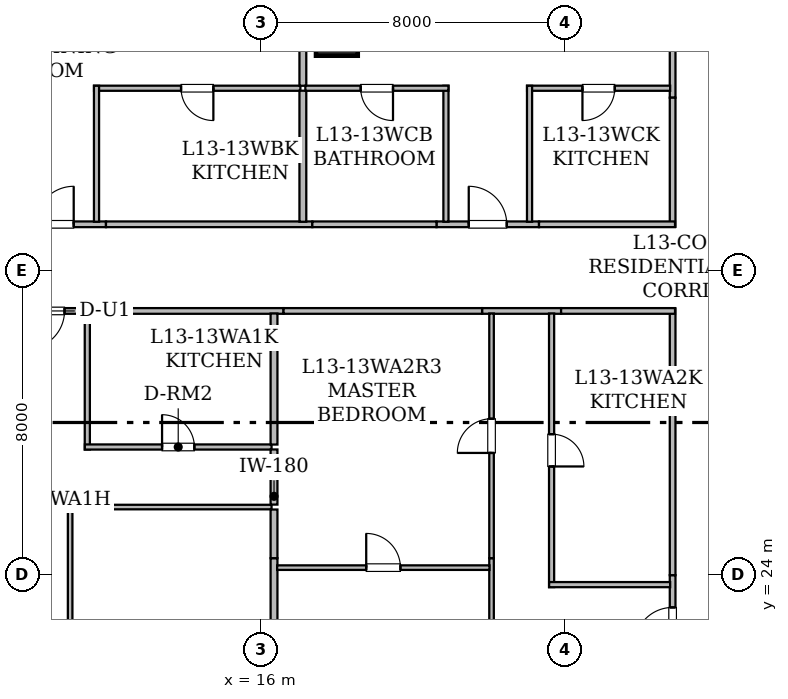
"""IFC4 building model, lengths in metres.
Left out: names, types, materials, properties, quantities, classifications, styles, units other than length and angle.
Written with IfcOpenShell. Run it as: python <this file> out.ifc"""

import sys

from ifc_helpers import new_model, si_unit, direction, frame, frame_2d, origin, origin_2d, place, context, subcontext, project, spatial, rectangle, hollow_rectangle, extrude, element, fill, save


model = new_model("IFC4")
c1 = context("Model", 3, precision=1e-05, world=origin(), true_north=direction((0.0, 1.0)))
c2 = subcontext(c1, "Body", "Model", "MODEL_VIEW")
j1 = project(units=[si_unit("LENGTHUNIT", "METRE"), si_unit("PLANEANGLEUNIT", "RADIAN")], contexts=[c1])
p1 = place(None, origin())
s1 = spatial("IfcSite", under=j1, at=p1, CompositionType="ELEMENT")
p2 = place(p1, origin())
s2 = spatial("IfcBuilding", under=s1, at=p2, CompositionType="ELEMENT")
p3 = place(p2, frame((0.0, 0.0, 55.2)))
s3 = spatial("IfcBuildingStorey", under=s2, at=p3, CompositionType="ELEMENT", Elevation=55.2)
p4 = place(p3, frame((18.0, 38.2, 0.0), z_axis=(0.0, 0.0, 1.0), x_axis=(1.0, 0.0, 0.0)))
e1 = element("IfcColumn", 1, at=p4, inside=s3, PredefinedType="COLUMN", context=c2, shape_type="SweptSolid", body=[
    extrude(hollow_rectangle(XDim=1.1, YDim=1.1, WallThickness=0.055, at=origin_2d()), origin(), (0.0, 0.0, 1.0), 3.65),
])
p5 = place(p3, frame((11.682, 30.935, 0.0), z_axis=(0.0, 0.0, 1.0), x_axis=(-1.0, 0.0, 0.0)))
e2 = element("IfcWall", 2, at=p5, inside=s3, PredefinedType="STANDARD", context=c2, shape_type="SweptSolid", body=[
    extrude(rectangle(XDim=2.698, YDim=0.15, at=frame_2d((1.349, 0.0))), origin(), (0.0, 0.0, 1.0), 3.43),
])
p6 = place(p5, frame((0.849, 0.0, 0.0)))
e3 = element("IfcOpeningElement", 3, at=p6, cuts=e2, PredefinedType="OPENING", context=c2, shape_type="SweptSolid", body=[
    extrude(rectangle(XDim=1.0, YDim=2.15, at=frame_2d((0.5, 1.075))), frame((0.0, 0.085, 0.0), z_axis=(0.0, -1.0, 0.0), x_axis=(1.0, 0.0, 0.0)), (0.0, 0.0, 1.0), 0.17),
])
p7 = place(p3, frame((16.596, 30.935, 0.0), z_axis=(0.0, 0.0, 1.0), x_axis=(-1.0, 0.0, 0.0)))
e4 = element("IfcWall", 4, at=p7, inside=s3, PredefinedType="STANDARD", context=c2, shape_type="SweptSolid", body=[
    extrude(rectangle(XDim=4.914, YDim=0.15, at=frame_2d((2.457, 0.0))), origin(), (0.0, 0.0, 1.0), 3.43),
])
p8 = place(p3, frame((26.835, 21.285, 0.0), z_axis=(0.0, 0.0, 1.0), x_axis=(0.0, 1.0, 0.0)))
e5 = element("IfcWall", 5, at=p8, inside=s3, PredefinedType="STANDARD", context=c2, shape_type="SweptSolid", body=[
    extrude(rectangle(XDim=2.698, YDim=0.15, at=frame_2d((1.349, 0.0))), origin(), (0.0, 0.0, 1.0), 3.43),
])
p9 = place(p8, frame((0.849, 0.0, 0.0)))
e6 = element("IfcOpeningElement", 6, at=p9, cuts=e5, PredefinedType="OPENING", context=c2, shape_type="SweptSolid", body=[
    extrude(rectangle(XDim=1.0, YDim=2.15, at=frame_2d((0.5, 1.075))), frame((0.0, 0.085, 0.0), z_axis=(0.0, -1.0, 0.0), x_axis=(1.0, 0.0, 0.0)), (0.0, 0.0, 1.0), 0.17),
])
p10 = place(p3, frame((23.9, 30.935, 0.0), z_axis=(0.0, 0.0, 1.0), x_axis=(-1.0, 0.0, 0.0)))
e7 = element("IfcWall", 7, at=p10, inside=s3, PredefinedType="STANDARD", context=c2, shape_type="SweptSolid", body=[
    extrude(rectangle(XDim=2.079, YDim=0.15, at=frame_2d((1.04, 0.0))), origin(), (0.0, 0.0, 1.0), 3.43),
])
p11 = place(p3, frame((26.835, 23.983, 0.0), z_axis=(0.0, 0.0, 1.0), x_axis=(0.0, 1.0, 0.0)))
e8 = element("IfcWall", 8, at=p11, inside=s3, PredefinedType="STANDARD", context=c2, shape_type="SweptSolid", body=[
    extrude(rectangle(XDim=7.017, YDim=0.15, at=frame_2d((3.509, 0.0))), origin(), (0.0, 0.0, 1.0), 2.957),
])
p12 = place(p3, frame((26.898, 30.935, 0.0), z_axis=(0.0, 0.0, 1.0), x_axis=(-1.0, 0.0, 0.0)))
e9 = element("IfcWall", 9, at=p12, inside=s3, PredefinedType="STANDARD", context=c2, shape_type="SweptSolid", body=[
    extrude(rectangle(XDim=2.998, YDim=0.15, at=frame_2d((1.499, 0.0))), origin(), (0.0, 0.0, 1.0), 3.43),
])
p13 = place(p3, frame((21.821, 30.935, 0.0), z_axis=(0.0, 0.0, 1.0), x_axis=(-1.0, 0.0, 0.0)))
e10 = element("IfcWall", 10, at=p13, inside=s3, PredefinedType="STANDARD", context=c2, shape_type="SweptSolid", body=[
    extrude(rectangle(XDim=5.225, YDim=0.15, at=frame_2d((2.613, 0.0))), origin(), (0.0, 0.0, 1.0), 2.647),
])
p14 = place(p3, frame((9.226, 33.215, 0.0), z_axis=(0.0, 0.0, 1.0), x_axis=(1.0, 0.0, 0.0)))
e11 = element("IfcWall", 11, at=p14, inside=s3, PredefinedType="STANDARD", context=c2, shape_type="SweptSolid", body=[
    extrude(rectangle(XDim=2.698, YDim=0.15, at=frame_2d((1.349, 0.0))), origin(), (0.0, 0.0, 1.0), 3.43),
])
p15 = place(p14, frame((0.849, 0.0, 0.0)))
e12 = element("IfcOpeningElement", 12, at=p15, cuts=e11, PredefinedType="OPENING", context=c2, shape_type="SweptSolid", body=[
    extrude(rectangle(XDim=1.0, YDim=2.15, at=frame_2d((0.5, 1.075))), frame((0.0, 0.085, 0.0), z_axis=(0.0, -1.0, 0.0), x_axis=(1.0, 0.0, 0.0)), (0.0, 0.0, 1.0), 0.17),
])
p16 = place(p3, frame((11.924, 33.215, 0.0), z_axis=(0.0, 0.0, 1.0), x_axis=(1.0, 0.0, 0.0)))
e13 = element("IfcWall", 13, at=p16, inside=s3, PredefinedType="STANDARD", context=c2, shape_type="SweptSolid", body=[
    extrude(rectangle(XDim=5.43, YDim=0.15, at=frame_2d((2.715, 0.0))), origin(), (0.0, 0.0, 1.0), 3.43),
])
p17 = place(p3, frame((26.835, 36.546, 0.0), z_axis=(0.0, 0.0, 1.0), x_axis=(0.0, 1.0, 0.0)))
e14 = element("IfcWall", 14, at=p17, inside=s3, PredefinedType="STANDARD", context=c2, shape_type="SweptSolid", body=[
    extrude(rectangle(XDim=2.554, YDim=0.15, at=frame_2d((1.277, 0.0))), origin(), (0.0, 0.0, 1.0), 2.647),
])
p18 = place(p3, frame((20.621, 33.215, 0.0), z_axis=(0.0, 0.0, 1.0), x_axis=(1.0, 0.0, 0.0)))
e15 = element("IfcWall", 15, at=p18, inside=s3, PredefinedType="STANDARD", context=c2, shape_type="SweptSolid", body=[
    extrude(rectangle(XDim=2.698, YDim=0.15, at=frame_2d((1.349, 0.0))), origin(), (0.0, 0.0, 1.0), 3.43),
])
p19 = place(p18, frame((0.849, 0.0, 0.0)))
e16 = element("IfcOpeningElement", 16, at=p19, cuts=e15, PredefinedType="OPENING", context=c2, shape_type="SweptSolid", body=[
    extrude(rectangle(XDim=1.0, YDim=2.15, at=frame_2d((0.5, 1.075))), frame((0.0, 0.085, 0.0), z_axis=(0.0, -1.0, 0.0), x_axis=(1.0, 0.0, 0.0)), (0.0, 0.0, 1.0), 0.17),
])
p20 = place(p3, frame((17.354, 33.215, 0.0), z_axis=(0.0, 0.0, 1.0), x_axis=(1.0, 0.0, 0.0)))
e17 = element("IfcWall", 17, at=p20, inside=s3, PredefinedType="STANDARD", context=c2, shape_type="SweptSolid", body=[
    extrude(rectangle(XDim=3.267, YDim=0.15, at=frame_2d((1.634, 0.0))), origin(), (0.0, 0.0, 1.0), 2.647),
])
p21 = place(p3, frame((26.835, 33.15, 0.0), z_axis=(0.0, 0.0, 1.0), x_axis=(0.0, 1.0, 0.0)))
e18 = element("IfcWall", 18, at=p21, inside=s3, PredefinedType="STANDARD", context=c2, shape_type="SweptSolid", body=[
    extrude(rectangle(XDim=3.396, YDim=0.15, at=frame_2d((1.698, 0.0))), origin(), (0.0, 0.0, 1.0), 3.43),
])
p22 = place(p3, frame((23.319, 33.215, 0.0), z_axis=(0.0, 0.0, 1.0), x_axis=(1.0, 0.0, 0.0)))
e19 = element("IfcWall", 19, at=p22, inside=s3, PredefinedType="STANDARD", context=c2, shape_type="SweptSolid", body=[
    extrude(rectangle(XDim=3.579, YDim=0.15, at=frame_2d((1.79, 0.0))), origin(), (0.0, 0.0, 1.0), 3.43),
])
p23 = place(p3, frame((11.433, 30.868, 0.0), z_axis=(0.0, 0.0, 1.0), x_axis=(0.0, -1.0, 0.0)))
e20 = element("IfcWall", 20, at=p23, inside=s3, PredefinedType="PARTITIONING", context=c2, shape_type="SweptSolid", body=[
    extrude(rectangle(XDim=3.578, YDim=0.135, at=frame_2d((1.789, 0.0))), origin(), (0.0, 0.0, 1.0), 3.43),
])
p24 = place(p3, frame((11.368, 27.355, 0.0), z_axis=(0.0, 0.0, 1.0), x_axis=(1.0, 0.0, 0.0)))
e21 = element("IfcWall", 21, at=p24, inside=s3, PredefinedType="PARTITIONING", context=c2, shape_type="SweptSolid", body=[
    extrude(rectangle(XDim=4.913, YDim=0.135, at=frame_2d((2.457, 0.0))), origin(), (0.0, 0.0, 1.0), 3.43),
])
p25 = place(p24, frame((2.032, 0.0, 0.0)))
e22 = element("IfcOpeningElement", 22, at=p25, cuts=e21, PredefinedType="OPENING", context=c2, shape_type="SweptSolid", body=[
    extrude(rectangle(XDim=0.85, YDim=2.1, at=frame_2d((0.425, 1.05))), frame((0.0, 0.077, 0.0), z_axis=(0.0, -1.0, 0.0), x_axis=(1.0, 0.0, 0.0)), (0.0, 0.0, 1.0), 0.155),
])
p26 = place(p3, frame((16.281, 25.775, 0.0), z_axis=(0.0, 0.0, 1.0), x_axis=(-1.0, 0.0, 0.0)))
e23 = element("IfcWall", 23, at=p26, inside=s3, PredefinedType="PARTITIONING", context=c2, shape_type="SweptSolid", body=[
    extrude(rectangle(XDim=5.365, YDim=0.12, at=frame_2d((2.683, 0.0))), origin(), (0.0, 0.0, 1.0), 3.43),
])
p27 = place(p3, frame((10.981, 25.84, 0.0), z_axis=(0.0, 0.0, 1.0), x_axis=(0.0, -1.0, 0.0)))
e24 = element("IfcWall", 24, at=p27, inside=s3, PredefinedType="PARTITIONING", context=c2, shape_type="SweptSolid", body=[
    extrude(rectangle(XDim=8.565, YDim=0.12, at=frame_2d((4.283, 0.0))), origin(), (0.0, 0.0, 1.0), 2.647),
])
p28 = place(p27, frame((3.832, 0.0, 0.0)))
e25 = element("IfcOpeningElement", 25, at=p28, cuts=e24, PredefinedType="OPENING", context=c2, shape_type="SweptSolid", body=[
    extrude(rectangle(XDim=0.9, YDim=2.1, at=frame_2d((0.45, 1.05))), frame((0.0, 0.07, 0.0), z_axis=(0.0, -1.0, 0.0), x_axis=(1.0, 0.0, 0.0)), (0.0, 0.0, 1.0), 0.14),
])
p29 = place(p3, frame((16.346, 27.29, 0.0), z_axis=(0.0, 0.0, 1.0), x_axis=(0.0, -1.0, 0.0)))
e26 = element("IfcWall", 26, at=p29, inside=s3, PredefinedType="STANDARD", context=c2, shape_type="SweptSolid", body=[
    extrude(rectangle(XDim=1.45, YDim=0.18, at=frame_2d((0.725, 0.0))), origin(), (0.0, 0.0, 1.0), 3.43),
])
p30 = place(p3, frame((16.346, 30.868, 0.0), z_axis=(0.0, 0.0, 1.0), x_axis=(0.0, -1.0, 0.0)))
e27 = element("IfcWall", 27, at=p30, inside=s3, PredefinedType="STANDARD", context=c2, shape_type="SweptSolid", body=[
    extrude(rectangle(XDim=3.448, YDim=0.18, at=frame_2d((1.724, 0.0))), origin(), (0.0, 0.0, 1.0), 3.43),
])
p31 = place(p3, frame((16.346, 24.43, 0.0), z_axis=(0.0, 0.0, 1.0), x_axis=(0.0, -1.0, 0.0)))
e28 = element("IfcWall", 28, at=p31, inside=s3, PredefinedType="STANDARD", context=c2, shape_type="SweptSolid", body=[
    extrude(rectangle(XDim=7.339, YDim=0.18, at=frame_2d((3.669, 0.0))), origin(), (0.0, 0.0, 1.0), 2.647),
])
p32 = place(p3, frame((16.346, 25.71, 0.0), z_axis=(0.0, 0.0, 1.0), x_axis=(0.0, -1.0, 0.0)))
e29 = element("IfcWall", 29, at=p32, inside=s3, PredefinedType="STANDARD", context=c2, shape_type="SweptSolid", body=[
    extrude(rectangle(XDim=1.28, YDim=0.18, at=frame_2d((0.64, 0.0))), origin(), (0.0, 0.0, 1.0), 2.957),
])
p33 = place(p3, frame((23.65, 30.868, 0.0), z_axis=(0.0, 0.0, 1.0), x_axis=(0.0, -1.0, 0.0)))
e30 = element("IfcWall", 30, at=p33, inside=s3, PredefinedType="PARTITIONING", context=c2, shape_type="SweptSolid", body=[
    extrude(rectangle(XDim=7.199, YDim=0.135, at=frame_2d((3.6, 0.0))), origin(), (0.0, 0.0, 1.0), 2.957),
])
p34 = place(p33, frame((3.175, 0.0, 0.0)))
e31 = element("IfcOpeningElement", 31, at=p34, cuts=e30, PredefinedType="OPENING", context=c2, shape_type="SweptSolid", body=[
    extrude(rectangle(XDim=0.85, YDim=2.1, at=frame_2d((0.425, 1.05))), frame((0.0, 0.077, 0.0), z_axis=(0.0, -1.0, 0.0), x_axis=(1.0, 0.0, 0.0)), (0.0, 0.0, 1.0), 0.155),
])
p35 = place(p3, frame((23.585, 23.734, 0.0), z_axis=(0.0, 0.0, 1.0), x_axis=(1.0, 0.0, 0.0)))
e32 = element("IfcWall", 32, at=p35, inside=s3, PredefinedType="PARTITIONING", context=c2, shape_type="SweptSolid", body=[
    extrude(rectangle(XDim=3.185, YDim=0.135, at=frame_2d((1.593, 0.0))), origin(), (0.0, 0.0, 1.0), 3.43),
])
p36 = place(p3, frame((22.07, 13.125, 0.0), z_axis=(0.0, 0.0, 1.0), x_axis=(0.0, 1.0, 0.0)))
e33 = element("IfcWall", 33, at=p36, inside=s3, PredefinedType="PARTITIONING", context=c2, shape_type="SweptSolid", body=[
    extrude(rectangle(XDim=11.305, YDim=0.12, at=frame_2d((5.652, 0.0))), origin(), (0.0, 0.0, 1.0), 2.647),
])
p37 = place(p36, frame((5.181, 0.0, 0.0)))
e34 = element("IfcOpeningElement", 34, at=p37, cuts=e33, PredefinedType="OPENING", context=c2, shape_type="SweptSolid", body=[
    extrude(rectangle(XDim=0.9, YDim=2.1, at=frame_2d((0.45, 1.05))), frame((0.0, 0.07, 0.0), z_axis=(0.0, -1.0, 0.0), x_axis=(1.0, 0.0, 0.0)), (0.0, 0.0, 1.0), 0.14),
])
p38 = place(p3, frame((22.07, 24.43, 0.0), z_axis=(0.0, 0.0, 1.0), x_axis=(0.0, 1.0, 0.0)))
e35 = element("IfcWall", 35, at=p38, inside=s3, PredefinedType="PARTITIONING", context=c2, shape_type="SweptSolid", body=[
    extrude(rectangle(XDim=6.438, YDim=0.12, at=frame_2d((3.219, 0.0))), origin(), (0.0, 0.0, 1.0), 2.957),
])
p39 = place(p38, frame((2.769, 0.0, 0.0)))
e36 = element("IfcOpeningElement", 36, at=p39, cuts=e35, PredefinedType="OPENING", context=c2, shape_type="SweptSolid", body=[
    extrude(rectangle(XDim=0.9, YDim=2.1, at=frame_2d((0.45, 1.05))), frame((0.0, 0.07, 0.0), z_axis=(0.0, -1.0, 0.0), x_axis=(1.0, 0.0, 0.0)), (0.0, 0.0, 1.0), 0.14),
])
p40 = place(p3, frame((16.428, 24.181, 0.0), z_axis=(0.0, 0.0, 1.0), x_axis=(1.0, 0.0, 0.0)))
e37 = element("IfcWall", 37, at=p40, inside=s3, PredefinedType="PARTITIONING", context=c2, shape_type="SweptSolid", body=[
    extrude(rectangle(XDim=5.588, YDim=0.12, at=frame_2d((2.794, 0.0))), origin(), (0.0, 0.0, 1.0), 2.647),
])
p41 = place(p40, frame((2.344, 0.0, 0.0)))
e38 = element("IfcOpeningElement", 38, at=p41, cuts=e37, PredefinedType="OPENING", context=c2, shape_type="SweptSolid", body=[
    extrude(rectangle(XDim=0.9, YDim=2.1, at=frame_2d((0.45, 1.05))), frame((0.0, 0.07, 0.0), z_axis=(0.0, -1.0, 0.0), x_axis=(1.0, 0.0, 0.0)), (0.0, 0.0, 1.0), 0.14),
])
p42 = place(p3, frame((17.04, 36.795, 0.0), z_axis=(0.0, 0.0, 1.0), x_axis=(-1.0, 0.0, 0.0)))
e39 = element("IfcWall", 39, at=p42, inside=s3, PredefinedType="PARTITIONING", context=c2, shape_type="SweptSolid", body=[
    extrude(rectangle(XDim=5.43, YDim=0.135, at=frame_2d((2.715, 0.0))), origin(), (0.0, 0.0, 1.0), 3.43),
])
p43 = place(p42, frame((2.29, 0.0, 0.0)))
e40 = element("IfcOpeningElement", 40, at=p43, cuts=e39, PredefinedType="OPENING", context=c2, shape_type="SweptSolid", body=[
    extrude(rectangle(XDim=0.85, YDim=2.1, at=frame_2d((0.425, 1.05))), frame((0.0, 0.077, 0.0), z_axis=(0.0, -1.0, 0.0), x_axis=(1.0, 0.0, 0.0)), (0.0, 0.0, 1.0), 0.155),
])
p44 = place(p3, frame((11.675, 36.86, 0.0), z_axis=(0.0, 0.0, 1.0), x_axis=(0.0, -1.0, 0.0)))
e41 = element("IfcWall", 41, at=p44, inside=s3, PredefinedType="PARTITIONING", context=c2, shape_type="SweptSolid", body=[
    extrude(rectangle(XDim=3.578, YDim=0.135, at=frame_2d((1.789, 0.0))), origin(), (0.0, 0.0, 1.0), 3.43),
])
p45 = place(p3, frame((17.105, 39.11, 0.0), z_axis=(0.0, 0.0, 1.0), x_axis=(0.0, -1.0, 0.0)))
e42 = element("IfcWall", 42, at=p45, inside=s3, PredefinedType="STANDARD", context=c2, shape_type="SweptSolid", body=[
    extrude(rectangle(XDim=2.25, YDim=0.18, at=frame_2d((1.125, 0.0))), origin(), (0.0, 0.0, 1.0), 2.647),
])
p46 = place(p3, frame((17.105, 36.73, 0.0), z_axis=(0.0, 0.0, 1.0), x_axis=(0.0, -1.0, 0.0)))
e43 = element("IfcWall", 43, at=p46, inside=s3, PredefinedType="STANDARD", context=c2, shape_type="SweptSolid", body=[
    extrude(rectangle(XDim=3.448, YDim=0.18, at=frame_2d((1.724, 0.0))), origin(), (0.0, 0.0, 1.0), 3.43),
])
p47 = place(p3, frame((20.87, 33.282, 0.0), z_axis=(0.0, 0.0, 1.0), x_axis=(0.0, 1.0, 0.0)))
e44 = element("IfcWall", 44, at=p47, inside=s3, PredefinedType="PARTITIONING", context=c2, shape_type="SweptSolid", body=[
    extrude(rectangle(XDim=3.578, YDim=0.135, at=frame_2d((1.789, 0.0))), origin(), (0.0, 0.0, 1.0), 3.43),
])
p48 = place(p3, frame((20.935, 36.795, 0.0), z_axis=(0.0, 0.0, 1.0), x_axis=(-1.0, 0.0, 0.0)))
e45 = element("IfcWall", 45, at=p48, inside=s3, PredefinedType="PARTITIONING", context=c2, shape_type="SweptSolid", body=[
    extrude(rectangle(XDim=3.765, YDim=0.135, at=frame_2d((1.883, 0.0))), origin(), (0.0, 0.0, 1.0), 2.647),
])
p49 = place(p48, frame((1.458, 0.0, 0.0)))
e46 = element("IfcOpeningElement", 46, at=p49, cuts=e45, PredefinedType="OPENING", context=c2, shape_type="SweptSolid", body=[
    extrude(rectangle(XDim=0.85, YDim=2.1, at=frame_2d((0.425, 1.05))), frame((0.0, 0.077, 0.0), z_axis=(0.0, -1.0, 0.0), x_axis=(1.0, 0.0, 0.0)), (0.0, 0.0, 1.0), 0.155),
])
p50 = place(p3, frame((26.77, 36.795, 0.0), z_axis=(0.0, 0.0, 1.0), x_axis=(-1.0, 0.0, 0.0)))
e47 = element("IfcWall", 47, at=p50, inside=s3, PredefinedType="PARTITIONING", context=c2, shape_type="SweptSolid", body=[
    extrude(rectangle(XDim=3.765, YDim=0.135, at=frame_2d((1.883, 0.0))), origin(), (0.0, 0.0, 1.0), 3.43),
])
p51 = place(p50, frame((1.458, 0.0, 0.0)))
e48 = element("IfcOpeningElement", 48, at=p51, cuts=e47, PredefinedType="OPENING", context=c2, shape_type="SweptSolid", body=[
    extrude(rectangle(XDim=0.85, YDim=2.1, at=frame_2d((0.425, 1.05))), frame((0.0, 0.077, 0.0), z_axis=(0.0, -1.0, 0.0), x_axis=(1.0, 0.0, 0.0)), (0.0, 0.0, 1.0), 0.155),
])
p52 = place(p3, frame((23.07, 36.86, 0.0), z_axis=(0.0, 0.0, 1.0), x_axis=(0.0, -1.0, 0.0)))
e49 = element("IfcWall", 49, at=p52, inside=s3, PredefinedType="PARTITIONING", context=c2, shape_type="SweptSolid", body=[
    extrude(rectangle(XDim=3.578, YDim=0.135, at=frame_2d((1.789, 0.0))), origin(), (0.0, 0.0, 1.0), 3.43),
])
p53 = place(p6, origin())
e50 = element("IfcDoor", 50, at=p53, inside=s3, OperationType="SINGLE_SWING_RIGHT", PredefinedType="DOOR", context=c2, shape_type="SweptSolid", body=[
    extrude(rectangle(XDim=1.0, YDim=2.15, at=frame_2d((0.5, 1.075))), frame((0.0, 0.025, 0.0), z_axis=(0.0, -1.0, 0.0), x_axis=(1.0, 0.0, 0.0)), (0.0, 0.0, 1.0), 0.05),
])
fill(e3, e50)
p54 = place(p9, origin())
e51 = element("IfcDoor", 51, at=p54, inside=s3, OperationType="SINGLE_SWING_LEFT", PredefinedType="DOOR", context=c2, shape_type="SweptSolid", body=[
    extrude(rectangle(XDim=1.0, YDim=2.15, at=frame_2d((0.5, 1.075))), frame((0.0, 0.025, 0.0), z_axis=(0.0, -1.0, 0.0), x_axis=(1.0, 0.0, 0.0)), (0.0, 0.0, 1.0), 0.05),
])
fill(e6, e51)
p55 = place(p15, origin())
e52 = element("IfcDoor", 52, at=p55, inside=s3, OperationType="SINGLE_SWING_RIGHT", PredefinedType="DOOR", context=c2, shape_type="SweptSolid", body=[
    extrude(rectangle(XDim=1.0, YDim=2.15, at=frame_2d((0.5, 1.075))), frame((0.0, 0.025, 0.0), z_axis=(0.0, -1.0, 0.0), x_axis=(1.0, 0.0, 0.0)), (0.0, 0.0, 1.0), 0.05),
])
fill(e12, e52)
p56 = place(p19, origin())
e53 = element("IfcDoor", 53, at=p56, inside=s3, OperationType="SINGLE_SWING_LEFT", PredefinedType="DOOR", context=c2, shape_type="SweptSolid", body=[
    extrude(rectangle(XDim=1.0, YDim=2.15, at=frame_2d((0.5, 1.075))), frame((0.0, 0.025, 0.0), z_axis=(0.0, -1.0, 0.0), x_axis=(1.0, 0.0, 0.0)), (0.0, 0.0, 1.0), 0.05),
])
fill(e16, e53)
p57 = place(p25, origin())
e54 = element("IfcDoor", 54, at=p57, inside=s3, OperationType="SINGLE_SWING_LEFT", PredefinedType="DOOR", context=c2, shape_type="SweptSolid", body=[
    extrude(rectangle(XDim=0.85, YDim=2.1, at=frame_2d((0.425, 1.05))), frame((0.0, 0.025, 0.0), z_axis=(0.0, -1.0, 0.0), x_axis=(1.0, 0.0, 0.0)), (0.0, 0.0, 1.0), 0.05),
])
fill(e22, e54)
p58 = place(p34, origin())
e55 = element("IfcDoor", 55, at=p58, inside=s3, OperationType="SINGLE_SWING_RIGHT", PredefinedType="DOOR", context=c2, shape_type="SweptSolid", body=[
    extrude(rectangle(XDim=0.85, YDim=2.1, at=frame_2d((0.425, 1.05))), frame((0.0, 0.025, 0.0), z_axis=(0.0, -1.0, 0.0), x_axis=(1.0, 0.0, 0.0)), (0.0, 0.0, 1.0), 0.05),
])
fill(e31, e55)
p59 = place(p39, origin())
e56 = element("IfcDoor", 56, at=p59, inside=s3, OperationType="SINGLE_SWING_LEFT", PredefinedType="DOOR", context=c2, shape_type="SweptSolid", body=[
    extrude(rectangle(XDim=0.9, YDim=2.1, at=frame_2d((0.45, 1.05))), frame((0.0, 0.025, 0.0), z_axis=(0.0, -1.0, 0.0), x_axis=(1.0, 0.0, 0.0)), (0.0, 0.0, 1.0), 0.05),
])
fill(e36, e56)
p60 = place(p41, origin())
e57 = element("IfcDoor", 57, at=p60, inside=s3, OperationType="SINGLE_SWING_LEFT", PredefinedType="DOOR", context=c2, shape_type="SweptSolid", body=[
    extrude(rectangle(XDim=0.9, YDim=2.1, at=frame_2d((0.45, 1.05))), frame((0.0, 0.025, 0.0), z_axis=(0.0, -1.0, 0.0), x_axis=(1.0, 0.0, 0.0)), (0.0, 0.0, 1.0), 0.05),
])
fill(e38, e57)
p61 = place(p43, origin())
e58 = element("IfcDoor", 58, at=p61, inside=s3, OperationType="SINGLE_SWING_LEFT", PredefinedType="DOOR", context=c2, shape_type="SweptSolid", body=[
    extrude(rectangle(XDim=0.85, YDim=2.1, at=frame_2d((0.425, 1.05))), frame((0.0, 0.025, 0.0), z_axis=(0.0, -1.0, 0.0), x_axis=(1.0, 0.0, 0.0)), (0.0, 0.0, 1.0), 0.05),
])
fill(e40, e58)
p62 = place(p49, origin())
e59 = element("IfcDoor", 59, at=p62, inside=s3, OperationType="SINGLE_SWING_LEFT", PredefinedType="DOOR", context=c2, shape_type="SweptSolid", body=[
    extrude(rectangle(XDim=0.85, YDim=2.1, at=frame_2d((0.425, 1.05))), frame((0.0, 0.025, 0.0), z_axis=(0.0, -1.0, 0.0), x_axis=(1.0, 0.0, 0.0)), (0.0, 0.0, 1.0), 0.05),
])
fill(e46, e59)
p63 = place(p51, origin())
e60 = element("IfcDoor", 60, at=p63, inside=s3, OperationType="SINGLE_SWING_RIGHT", PredefinedType="DOOR", context=c2, shape_type="SweptSolid", body=[
    extrude(rectangle(XDim=0.85, YDim=2.1, at=frame_2d((0.425, 1.05))), frame((0.0, 0.025, 0.0), z_axis=(0.0, -1.0, 0.0), x_axis=(1.0, 0.0, 0.0)), (0.0, 0.0, 1.0), 0.05),
])
fill(e48, e60)
save(model, sys.argv[1])
